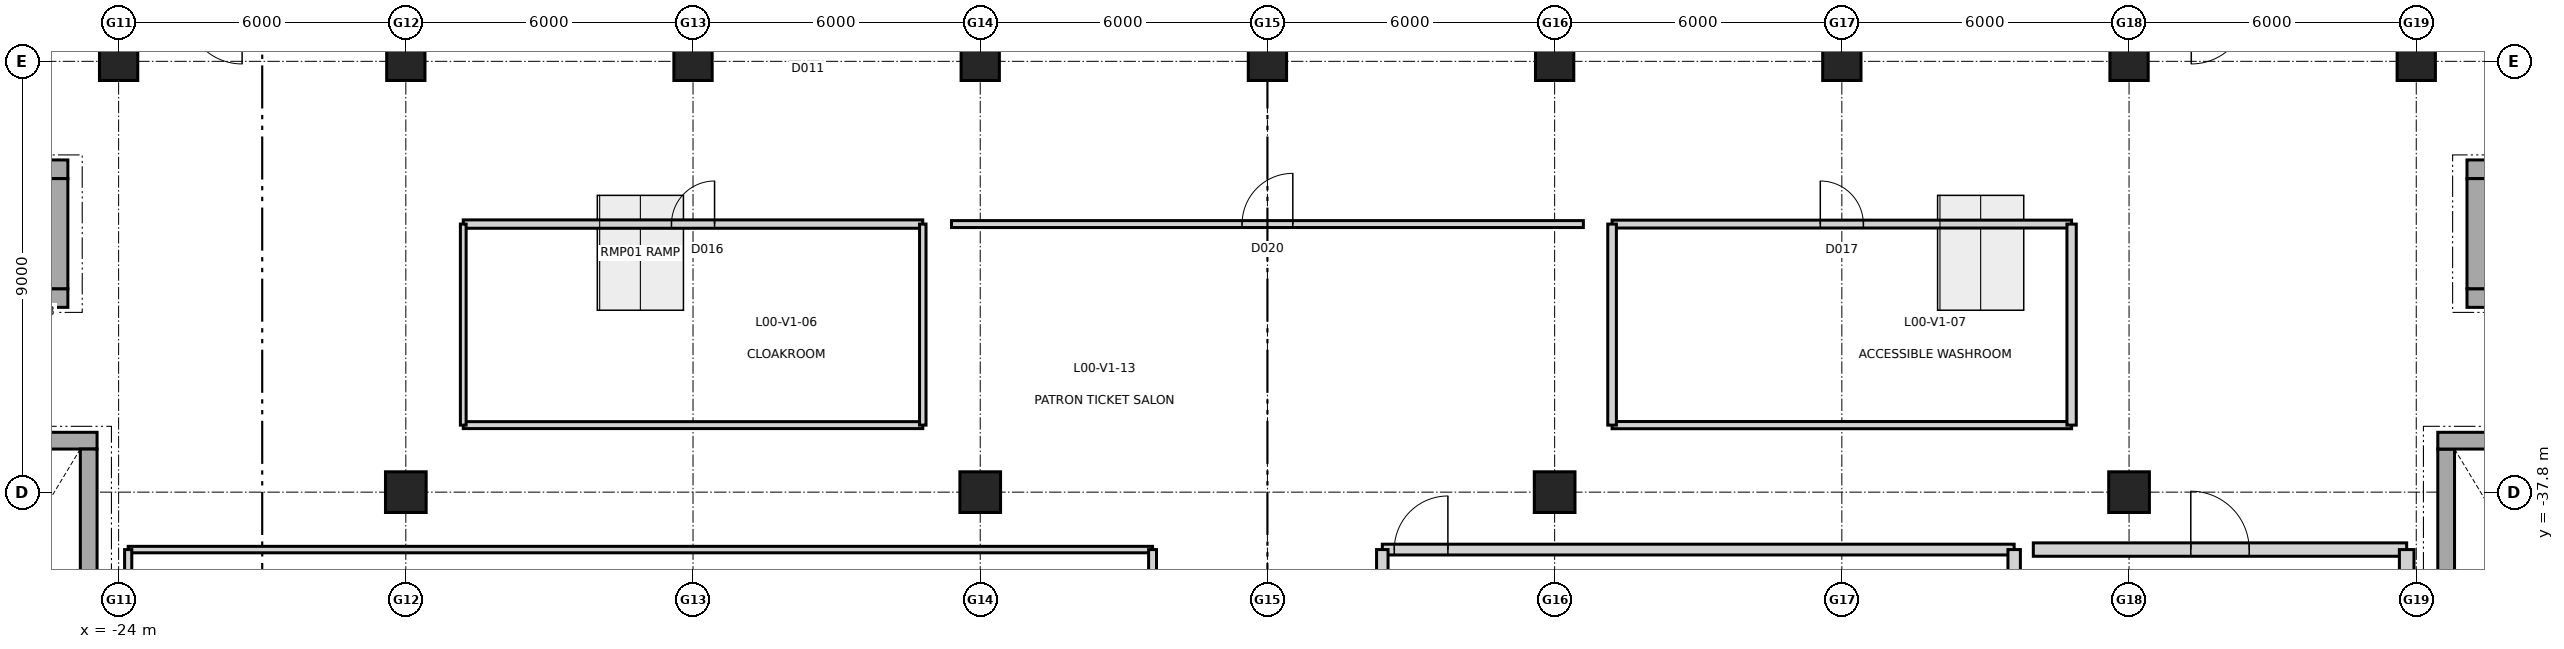
"""IFC4 building model, lengths in metres.
Left out: names, types, materials, properties, quantities, classifications, styles, units other than length and angle.
Written with IfcOpenShell. Run it as: python <this file> out.ifc"""

import sys

from ifc_helpers import new_model, si_unit, direction, frame, frame_2d, origin, origin_2d, place, context, subcontext, project, spatial, rectangle, circle, extrude, element, fill, save


model = new_model("IFC4")
c1 = context("Model", 3, precision=1e-05, world=origin(), true_north=direction((0.0, 1.0)))
c2 = subcontext(c1, "Body", "Model", "MODEL_VIEW")
j1 = project(units=[si_unit("LENGTHUNIT", "METRE"), si_unit("PLANEANGLEUNIT", "RADIAN")], contexts=[c1])
p1 = place(None, origin())
s1 = spatial("IfcSite", under=j1, at=p1, CompositionType="ELEMENT")
p2 = place(p1, origin())
s2 = spatial("IfcBuilding", under=s1, at=p2, CompositionType="ELEMENT")
p3 = place(p2, origin())
s3 = spatial("IfcBuildingStorey", under=s2, at=p3, CompositionType="ELEMENT", Elevation=0.0)
p4 = place(p3, frame((-24.0, -28.8, 0.0), z_axis=(0.0, 0.0, 1.0), x_axis=(1.0, 0.0, 0.0)))
e1 = element("IfcColumn", 1, at=p4, inside=s3, PredefinedType="COLUMN", context=c2, shape_type="SweptSolid", body=[
    extrude(rectangle(XDim=0.8, YDim=0.8, at=origin_2d()), origin(), (0.0, 0.0, 1.0), 5.4),
])
p5 = place(p3, frame((-18.0, -37.8, 0.0), z_axis=(0.0, 0.0, 1.0), x_axis=(1.0, 0.0, 0.0)))
e2 = element("IfcColumn", 2, at=p5, inside=s3, PredefinedType="COLUMN", context=c2, shape_type="SweptSolid", body=[
    extrude(circle(Radius=0.425, at=origin_2d()), origin(), (0.0, 0.0, 1.0), 5.4),
])
for number, where, z_axis, x_axis in (
    (3, (-18.0, -28.8, 0.0), (0.0, 0.0, 1.0), (1.0, 0.0, 0.0)),
    (4, (-12.0, -28.8, 0.0), (0.0, 0.0, 1.0), (1.0, 0.0, 0.0)),
):
    element("IfcColumn", number, at=place(p3, frame(where, z_axis=z_axis, x_axis=x_axis)), inside=s3, PredefinedType="COLUMN", context=c2, shape_type="SweptSolid", body=[
        extrude(rectangle(XDim=0.8, YDim=0.8, at=origin_2d()), origin(), (0.0, 0.0, 1.0), 5.4),
    ])
p6 = place(p3, frame((-6.0, -37.8, 0.0), z_axis=(0.0, 0.0, 1.0), x_axis=(1.0, 0.0, 0.0)))
e5 = element("IfcColumn", 5, at=p6, inside=s3, PredefinedType="COLUMN", context=c2, shape_type="SweptSolid", body=[
    extrude(circle(Radius=0.425, at=origin_2d()), origin(), (0.0, 0.0, 1.0), 5.4),
])
for number, where, z_axis, x_axis in (
    (6, (-6.0, -28.8, 0.0), (0.0, 0.0, 1.0), (1.0, 0.0, 0.0)),
    (7, (0.0, -28.8, 0.0), (0.0, 0.0, 1.0), (1.0, 0.0, 0.0)),
):
    element("IfcColumn", number, at=place(p3, frame(where, z_axis=z_axis, x_axis=x_axis)), inside=s3, PredefinedType="COLUMN", context=c2, shape_type="SweptSolid", body=[
        extrude(rectangle(XDim=0.8, YDim=0.8, at=origin_2d()), origin(), (0.0, 0.0, 1.0), 5.4),
    ])
p7 = place(p3, frame((6.0, -37.8, 0.0), z_axis=(0.0, 0.0, 1.0), x_axis=(1.0, 0.0, 0.0)))
e8 = element("IfcColumn", 8, at=p7, inside=s3, PredefinedType="COLUMN", context=c2, shape_type="SweptSolid", body=[
    extrude(circle(Radius=0.425, at=origin_2d()), origin(), (0.0, 0.0, 1.0), 5.4),
])
for number, where, z_axis, x_axis in (
    (9, (6.0, -28.8, 0.0), (0.0, 0.0, 1.0), (1.0, 0.0, 0.0)),
    (10, (12.0, -28.8, 0.0), (0.0, 0.0, 1.0), (1.0, 0.0, 0.0)),
):
    element("IfcColumn", number, at=place(p3, frame(where, z_axis=z_axis, x_axis=x_axis)), inside=s3, PredefinedType="COLUMN", context=c2, shape_type="SweptSolid", body=[
        extrude(rectangle(XDim=0.8, YDim=0.8, at=origin_2d()), origin(), (0.0, 0.0, 1.0), 5.4),
    ])
p8 = place(p3, frame((18.0, -37.8, 0.0), z_axis=(0.0, 0.0, 1.0), x_axis=(1.0, 0.0, 0.0)))
e11 = element("IfcColumn", 11, at=p8, inside=s3, PredefinedType="COLUMN", context=c2, shape_type="SweptSolid", body=[
    extrude(circle(Radius=0.425, at=origin_2d()), origin(), (0.0, 0.0, 1.0), 5.4),
])
for number, where, z_axis, x_axis in (
    (12, (18.0, -28.8, 0.0), (0.0, 0.0, 1.0), (1.0, 0.0, 0.0)),
    (13, (24.0, -28.8, 0.0), (0.0, 0.0, 1.0), (1.0, 0.0, 0.0)),
):
    element("IfcColumn", number, at=place(p3, frame(where, z_axis=z_axis, x_axis=x_axis)), inside=s3, PredefinedType="COLUMN", context=c2, shape_type="SweptSolid", body=[
        extrude(rectangle(XDim=0.8, YDim=0.8, at=origin_2d()), origin(), (0.0, 0.0, 1.0), 5.4),
    ])
p9 = place(p3, frame((-29.05, -36.725, 0.0), z_axis=(0.0, 0.0, 1.0), x_axis=(1.0, 0.0, 0.0)))
e14 = element("IfcWall", 14, at=p9, inside=s3, PredefinedType="SHEAR", context=c2, shape_type="SweptSolid", body=[
    extrude(rectangle(XDim=4.6, YDim=0.35, at=frame_2d((2.3, 0.0))), origin(), (0.0, 0.0, 1.0), 5.4),
])
p10 = place(p3, frame((-24.625, -36.9, 0.0), z_axis=(0.0, 0.0, 1.0), x_axis=(0.0, -1.0, 0.0)))
e15 = element("IfcWall", 15, at=p10, inside=s3, PredefinedType="SHEAR", context=c2, shape_type="SweptSolid", body=[
    extrude(rectangle(XDim=8.3, YDim=0.35, at=frame_2d((4.15, 0.0))), origin(), (0.0, 0.0, 1.0), 5.4),
])
p11 = place(p10, frame((6.77, 0.0, 0.0)))
e16 = element("IfcOpeningElement", 16, at=p11, cuts=e15, PredefinedType="OPENING", context=c2, shape_type="SweptSolid", body=[
    extrude(rectangle(XDim=1.18, YDim=2.15, at=frame_2d((0.59, 1.075))), frame((0.0, 0.185, 0.0), z_axis=(0.0, -1.0, 0.0), x_axis=(1.0, 0.0, 0.0)), (0.0, 0.0, 1.0), 0.37),
])
p12 = place(p3, frame((24.625, -45.2, 0.0), z_axis=(0.0, 0.0, 1.0), x_axis=(0.0, 1.0, 0.0)))
e17 = element("IfcWall", 17, at=p12, inside=s3, PredefinedType="SHEAR", context=c2, shape_type="SweptSolid", body=[
    extrude(rectangle(XDim=8.3, YDim=0.35, at=frame_2d((4.15, 0.0))), origin(), (0.0, 0.0, 1.0), 5.4),
])
p13 = place(p12, frame((0.35, 0.0, 0.0)))
e18 = element("IfcOpeningElement", 18, at=p13, cuts=e17, PredefinedType="OPENING", context=c2, shape_type="SweptSolid", body=[
    extrude(rectangle(XDim=1.18, YDim=2.15, at=frame_2d((0.59, 1.075))), frame((0.0, 0.185, 0.0), z_axis=(0.0, -1.0, 0.0), x_axis=(1.0, 0.0, 0.0)), (0.0, 0.0, 1.0), 0.37),
])
p14 = place(p3, frame((24.45, -36.725, 0.0), z_axis=(0.0, 0.0, 1.0), x_axis=(1.0, 0.0, 0.0)))
e19 = element("IfcWall", 19, at=p14, inside=s3, PredefinedType="SHEAR", context=c2, shape_type="SweptSolid", body=[
    extrude(rectangle(XDim=4.6, YDim=0.35, at=frame_2d((2.3, 0.0))), origin(), (0.0, 0.0, 1.0), 5.4),
])
p15 = place(p3, frame((-25.06, -33.745, 0.0), z_axis=(0.0, 0.0, 1.0), x_axis=(-1.0, 0.0, 0.0)))
e20 = element("IfcWall", 20, at=p15, inside=s3, PredefinedType="SHEAR", context=c2, shape_type="SweptSolid", body=[
    extrude(rectangle(XDim=3.48, YDim=0.39, at=frame_2d((1.74, 0.0))), origin(), (0.0, 0.0, 1.0), 5.4),
])
p16 = place(p3, frame((-28.54, -31.055, 0.0), z_axis=(0.0, 0.0, 1.0), x_axis=(1.0, 0.0, 0.0)))
e21 = element("IfcWall", 21, at=p16, inside=s3, PredefinedType="SHEAR", context=c2, shape_type="SweptSolid", body=[
    extrude(rectangle(XDim=3.48, YDim=0.39, at=frame_2d((1.74, 0.0))), origin(), (0.0, 0.0, 1.0), 5.4),
])
p17 = place(p16, frame((1.19, 0.0, 0.0)))
e22 = element("IfcOpeningElement", 22, at=p17, cuts=e21, PredefinedType="OPENING", context=c2, shape_type="SweptSolid", body=[
    extrude(rectangle(XDim=1.1, YDim=2.15, at=frame_2d((0.55, 1.075))), frame((0.0, 0.205, 0.0), z_axis=(0.0, -1.0, 0.0), x_axis=(1.0, 0.0, 0.0)), (0.0, 0.0, 1.0), 0.41),
])
p18 = place(p3, frame((-25.255, -31.25, 0.0), z_axis=(0.0, 0.0, 1.0), x_axis=(0.0, -1.0, 0.0)))
e23 = element("IfcWall", 23, at=p18, inside=s3, PredefinedType="SHEAR", context=c2, shape_type="SweptSolid", body=[
    extrude(rectangle(XDim=2.3, YDim=0.39, at=frame_2d((1.15, 0.0))), origin(), (0.0, 0.0, 1.0), 5.4),
])
p19 = place(p3, frame((28.54, -33.745, 0.0), z_axis=(0.0, 0.0, 1.0), x_axis=(-1.0, 0.0, 0.0)))
e24 = element("IfcWall", 24, at=p19, inside=s3, PredefinedType="SHEAR", context=c2, shape_type="SweptSolid", body=[
    extrude(rectangle(XDim=3.48, YDim=0.39, at=frame_2d((1.74, 0.0))), origin(), (0.0, 0.0, 1.0), 5.4),
])
p20 = place(p3, frame((25.06, -31.055, 0.0), z_axis=(0.0, 0.0, 1.0), x_axis=(1.0, 0.0, 0.0)))
e25 = element("IfcWall", 25, at=p20, inside=s3, PredefinedType="SHEAR", context=c2, shape_type="SweptSolid", body=[
    extrude(rectangle(XDim=3.48, YDim=0.39, at=frame_2d((1.74, 0.0))), origin(), (0.0, 0.0, 1.0), 5.4),
])
p21 = place(p20, frame((1.19, 0.0, 0.0)))
e26 = element("IfcOpeningElement", 26, at=p21, cuts=e25, PredefinedType="OPENING", context=c2, shape_type="SweptSolid", body=[
    extrude(rectangle(XDim=1.1, YDim=2.15, at=frame_2d((0.55, 1.075))), frame((0.0, 0.205, 0.0), z_axis=(0.0, -1.0, 0.0), x_axis=(1.0, 0.0, 0.0)), (0.0, 0.0, 1.0), 0.41),
])
p22 = place(p3, frame((25.255, -33.55, 0.0), z_axis=(0.0, 0.0, 1.0), x_axis=(0.0, 1.0, 0.0)))
e27 = element("IfcWall", 27, at=p22, inside=s3, PredefinedType="SHEAR", context=c2, shape_type="SweptSolid", body=[
    extrude(rectangle(XDim=2.3, YDim=0.39, at=frame_2d((1.15, 0.0))), origin(), (0.0, 0.0, 1.0), 5.4),
])
p23 = place(p3, frame((-23.8, -39.0, 0.0), z_axis=(0.0, 0.0, 1.0), x_axis=(1.0, 0.0, 0.0)))
e28 = element("IfcWall", 28, at=p23, inside=s3, PredefinedType="PARTITIONING", context=c2, shape_type="SweptSolid", body=[
    extrude(rectangle(XDim=21.4, YDim=0.135, at=frame_2d((10.7, 0.0))), origin(), (0.0, 0.0, 1.0), 5.02),
])
p24 = place(p3, frame((-23.8, -55.0, 0.0), z_axis=(0.0, 0.0, 1.0), x_axis=(0.0, 1.0, 0.0)))
e29 = element("IfcWall", 29, at=p24, inside=s3, PredefinedType="PARTITIONING", context=c2, shape_type="SweptSolid", body=[
    extrude(rectangle(XDim=16.0, YDim=0.15, at=frame_2d((8.0, 0.0))), origin(), (0.0, 0.0, 1.0), 5.02),
])
p25 = place(p24, frame((7.15, 0.0, 0.0)))
e30 = element("IfcOpeningElement", 30, at=p25, cuts=e29, PredefinedType="OPENING", context=c2, shape_type="SweptSolid", body=[
    extrude(rectangle(XDim=1.7, YDim=2.25, at=frame_2d((0.85, 1.125))), frame((0.0, 0.085, 0.0), z_axis=(0.0, -1.0, 0.0), x_axis=(1.0, 0.0, 0.0)), (0.0, 0.0, 1.0), 0.17),
])
p26 = place(p3, frame((-2.4, -55.0, 0.0), z_axis=(0.0, 0.0, 1.0), x_axis=(0.0, 1.0, 0.0)))
e31 = element("IfcWall", 31, at=p26, inside=s3, PredefinedType="PARTITIONING", context=c2, shape_type="SweptSolid", body=[
    extrude(rectangle(XDim=16.0, YDim=0.165, at=frame_2d((8.0, 0.0))), origin(), (0.0, 0.0, 1.0), 5.02),
])
p27 = place(p3, frame((2.4, -39.0, 0.0), z_axis=(0.0, 0.0, 1.0), x_axis=(1.0, 0.0, 0.0)))
e32 = element("IfcWall", 32, at=p27, inside=s3, PredefinedType="PARTITIONING", context=c2, shape_type="SweptSolid", body=[
    extrude(rectangle(XDim=13.2, YDim=0.225, at=frame_2d((6.6, 0.0))), origin(), (0.0, 0.0, 1.0), 5.02),
])
p28 = place(p27, frame((0.25, 0.0, 0.0)))
e33 = element("IfcOpeningElement", 33, at=p28, cuts=e32, PredefinedType="OPENING", context=c2, shape_type="SweptSolid", body=[
    extrude(rectangle(XDim=1.12, YDim=2.25, at=frame_2d((0.56, 1.125))), frame((0.0, 0.123, 0.0), z_axis=(0.0, -1.0, 0.0), x_axis=(1.0, 0.0, 0.0)), (0.0, 0.0, 1.0), 0.245),
])
p29 = place(p3, frame((2.4, -47.6, 0.0), z_axis=(0.0, 0.0, 1.0), x_axis=(0.0, 1.0, 0.0)))
e34 = element("IfcWall", 34, at=p29, inside=s3, PredefinedType="PARTITIONING", context=c2, shape_type="SweptSolid", body=[
    extrude(rectangle(XDim=8.6, YDim=0.24, at=frame_2d((4.3, 0.0))), origin(), (0.0, 0.0, 1.0), 5.02),
])
p30 = place(p3, frame((15.6, -47.6, 0.0), z_axis=(0.0, 0.0, 1.0), x_axis=(0.0, 1.0, 0.0)))
e35 = element("IfcWall", 35, at=p30, inside=s3, PredefinedType="PARTITIONING", context=c2, shape_type="SweptSolid", body=[
    extrude(rectangle(XDim=8.6, YDim=0.26, at=frame_2d((4.3, 0.0))), origin(), (0.0, 0.0, 1.0), 5.02),
])
p31 = place(p3, frame((16.0, -39.0, 0.0), z_axis=(0.0, 0.0, 1.0), x_axis=(1.0, 0.0, 0.0)))
e36 = element("IfcWall", 36, at=p31, inside=s3, PredefinedType="PARTITIONING", context=c2, shape_type="SweptSolid", body=[
    extrude(rectangle(XDim=7.8, YDim=0.28, at=frame_2d((3.9, 0.0))), origin(), (0.0, 0.0, 1.0), 5.02),
])
p32 = place(p31, frame((3.29, 0.0, 0.0)))
e37 = element("IfcOpeningElement", 37, at=p32, cuts=e36, PredefinedType="OPENING", context=c2, shape_type="SweptSolid", body=[
    extrude(rectangle(XDim=1.22, YDim=2.3, at=frame_2d((0.61, 1.15))), frame((0.0, 0.15, 0.0), z_axis=(0.0, -1.0, 0.0), x_axis=(1.0, 0.0, 0.0)), (0.0, 0.0, 1.0), 0.3),
])
p33 = place(p3, frame((23.8, -47.6, 0.0), z_axis=(0.0, 0.0, 1.0), x_axis=(0.0, 1.0, 0.0)))
e38 = element("IfcWall", 38, at=p33, inside=s3, PredefinedType="PARTITIONING", context=c2, shape_type="SweptSolid", body=[
    extrude(rectangle(XDim=8.6, YDim=0.305, at=frame_2d((4.3, 0.0))), origin(), (0.0, 0.0, 1.0), 5.02),
])
p34 = place(p3, frame((-16.8, -36.4, 0.0), z_axis=(0.0, 0.0, 1.0), x_axis=(1.0, 0.0, 0.0)))
e39 = element("IfcWall", 39, at=p34, inside=s3, PredefinedType="PARTITIONING", context=c2, shape_type="SweptSolid", body=[
    extrude(rectangle(XDim=9.6, YDim=0.145, at=frame_2d((4.8, 0.0))), origin(), (0.0, 0.0, 1.0), 5.02),
])
p35 = place(p3, frame((-16.8, -32.2, 0.0), z_axis=(0.0, 0.0, 1.0), x_axis=(1.0, 0.0, 0.0)))
e40 = element("IfcWall", 40, at=p35, inside=s3, PredefinedType="PARTITIONING", context=c2, shape_type="SweptSolid", body=[
    extrude(rectangle(XDim=9.6, YDim=0.175, at=frame_2d((4.8, 0.0))), origin(), (0.0, 0.0, 1.0), 5.02),
])
p36 = place(p35, frame((4.35, 0.0, 0.0)))
e41 = element("IfcOpeningElement", 41, at=p36, cuts=e40, PredefinedType="OPENING", context=c2, shape_type="SweptSolid", body=[
    extrude(rectangle(XDim=0.9, YDim=2.1, at=frame_2d((0.45, 1.05))), frame((0.0, 0.097, 0.0), z_axis=(0.0, -1.0, 0.0), x_axis=(1.0, 0.0, 0.0)), (0.0, 0.0, 1.0), 0.195),
])
p37 = place(p3, frame((-16.8, -36.4, 0.0), z_axis=(0.0, 0.0, 1.0), x_axis=(0.0, 1.0, 0.0)))
e42 = element("IfcWall", 42, at=p37, inside=s3, PredefinedType="PARTITIONING", context=c2, shape_type="SweptSolid", body=[
    extrude(rectangle(XDim=4.2, YDim=0.12, at=frame_2d((2.1, 0.0))), origin(), (0.0, 0.0, 1.0), 5.02),
])
p38 = place(p3, frame((-7.2, -36.4, 0.0), z_axis=(0.0, 0.0, 1.0), x_axis=(0.0, 1.0, 0.0)))
e43 = element("IfcWall", 43, at=p38, inside=s3, PredefinedType="PARTITIONING", context=c2, shape_type="SweptSolid", body=[
    extrude(rectangle(XDim=4.2, YDim=0.135, at=frame_2d((2.1, 0.0))), origin(), (0.0, 0.0, 1.0), 5.02),
])
p39 = place(p3, frame((7.2, -36.4, 0.0), z_axis=(0.0, 0.0, 1.0), x_axis=(1.0, 0.0, 0.0)))
e44 = element("IfcWall", 44, at=p39, inside=s3, PredefinedType="PARTITIONING", context=c2, shape_type="SweptSolid", body=[
    extrude(rectangle(XDim=9.6, YDim=0.15, at=frame_2d((4.8, 0.0))), origin(), (0.0, 0.0, 1.0), 5.02),
])
p40 = place(p3, frame((7.2, -32.2, 0.0), z_axis=(0.0, 0.0, 1.0), x_axis=(1.0, 0.0, 0.0)))
e45 = element("IfcWall", 45, at=p40, inside=s3, PredefinedType="PARTITIONING", context=c2, shape_type="SweptSolid", body=[
    extrude(rectangle(XDim=9.6, YDim=0.165, at=frame_2d((4.8, 0.0))), origin(), (0.0, 0.0, 1.0), 5.02),
])
p41 = place(p40, frame((4.35, 0.0, 0.0)))
e46 = element("IfcOpeningElement", 46, at=p41, cuts=e45, PredefinedType="OPENING", context=c2, shape_type="SweptSolid", body=[
    extrude(rectangle(XDim=0.9, YDim=2.1, at=frame_2d((0.45, 1.05))), frame((0.0, 0.093, 0.0), z_axis=(0.0, -1.0, 0.0), x_axis=(1.0, 0.0, 0.0)), (0.0, 0.0, 1.0), 0.185),
])
p42 = place(p3, frame((7.2, -36.4, 0.0), z_axis=(0.0, 0.0, 1.0), x_axis=(0.0, 1.0, 0.0)))
e47 = element("IfcWall", 47, at=p42, inside=s3, PredefinedType="PARTITIONING", context=c2, shape_type="SweptSolid", body=[
    extrude(rectangle(XDim=4.2, YDim=0.18, at=frame_2d((2.1, 0.0))), origin(), (0.0, 0.0, 1.0), 5.02),
])
p43 = place(p3, frame((16.8, -36.4, 0.0), z_axis=(0.0, 0.0, 1.0), x_axis=(0.0, 1.0, 0.0)))
e48 = element("IfcWall", 48, at=p43, inside=s3, PredefinedType="PARTITIONING", context=c2, shape_type="SweptSolid", body=[
    extrude(rectangle(XDim=4.2, YDim=0.195, at=frame_2d((2.1, 0.0))), origin(), (0.0, 0.0, 1.0), 5.02),
])
p44 = place(p3, frame((-6.6, -32.2, 0.0), z_axis=(0.0, 0.0, 1.0), x_axis=(1.0, 0.0, 0.0)))
e49 = element("IfcWall", 49, at=p44, inside=s3, PredefinedType="PARTITIONING", context=c2, shape_type="SweptSolid", body=[
    extrude(rectangle(XDim=13.2, YDim=0.145, at=frame_2d((6.6, 0.0))), origin(), (0.0, 0.0, 1.0), 5.02),
])
p45 = place(p44, frame((6.07, 0.0, 0.0)))
e50 = element("IfcOpeningElement", 50, at=p45, cuts=e49, PredefinedType="OPENING", context=c2, shape_type="SweptSolid", body=[
    extrude(rectangle(XDim=1.06, YDim=2.15, at=frame_2d((0.53, 1.075))), frame((0.0, 0.083, 0.0), z_axis=(0.0, -1.0, 0.0), x_axis=(1.0, 0.0, 0.0)), (0.0, 0.0, 1.0), 0.165),
])
p46 = place(p28, origin())
e51 = element("IfcDoor", 51, at=p46, inside=s3, OperationType="SINGLE_SWING_RIGHT", PredefinedType="DOOR", context=c2, shape_type="SweptSolid", body=[
    extrude(rectangle(XDim=1.12, YDim=2.25, at=frame_2d((0.56, 1.125))), frame((0.0, 0.025, 0.0), z_axis=(0.0, -1.0, 0.0), x_axis=(1.0, 0.0, 0.0)), (0.0, 0.0, 1.0), 0.05),
])
fill(e33, e51)
p47 = place(p32, origin())
e52 = element("IfcDoor", 52, at=p47, inside=s3, OperationType="SINGLE_SWING_LEFT", PredefinedType="DOOR", context=c2, shape_type="SweptSolid", body=[
    extrude(rectangle(XDim=1.22, YDim=2.3, at=frame_2d((0.61, 1.15))), frame((0.0, 0.025, 0.0), z_axis=(0.0, -1.0, 0.0), x_axis=(1.0, 0.0, 0.0)), (0.0, 0.0, 1.0), 0.05),
])
fill(e37, e52)
p48 = place(p36, origin())
e53 = element("IfcDoor", 53, at=p48, inside=s3, OperationType="SINGLE_SWING_RIGHT", PredefinedType="DOOR", context=c2, shape_type="SweptSolid", body=[
    extrude(rectangle(XDim=0.9, YDim=2.1, at=frame_2d((0.45, 1.05))), frame((0.0, 0.025, 0.0), z_axis=(0.0, -1.0, 0.0), x_axis=(1.0, 0.0, 0.0)), (0.0, 0.0, 1.0), 0.05),
])
fill(e41, e53)
p49 = place(p41, origin())
e54 = element("IfcDoor", 54, at=p49, inside=s3, OperationType="SINGLE_SWING_LEFT", PredefinedType="DOOR", context=c2, shape_type="SweptSolid", body=[
    extrude(rectangle(XDim=0.9, YDim=2.1, at=frame_2d((0.45, 1.05))), frame((0.0, 0.025, 0.0), z_axis=(0.0, -1.0, 0.0), x_axis=(1.0, 0.0, 0.0)), (0.0, 0.0, 1.0), 0.05),
])
fill(e46, e54)
p50 = place(p45, origin())
e55 = element("IfcDoor", 55, at=p50, inside=s3, OperationType="SINGLE_SWING_RIGHT", PredefinedType="DOOR", context=c2, shape_type="SweptSolid", body=[
    extrude(rectangle(XDim=1.06, YDim=2.15, at=frame_2d((0.53, 1.075))), frame((0.0, 0.025, 0.0), z_axis=(0.0, -1.0, 0.0), x_axis=(1.0, 0.0, 0.0)), (0.0, 0.0, 1.0), 0.05),
])
fill(e50, e55)
save(model, sys.argv[1])
